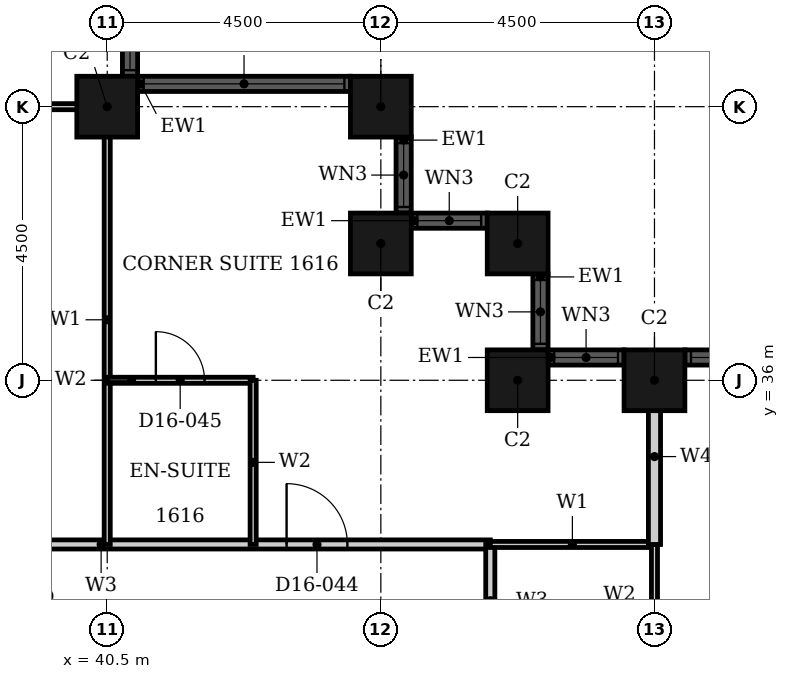
"""IFC4 building model, lengths in metres.
Left out: names, types, materials, properties, quantities, classifications, styles, units other than length and angle.
Written with IfcOpenShell. Run it as: python <this file> out.ifc"""

import sys

from ifc_helpers import new_model, si_unit, direction, frame, frame_2d, origin, origin_2d, place, context, subcontext, project, spatial, rectangle, hollow_rectangle, extrude, element, fill, save


model = new_model("IFC4")
c1 = context("Model", 3, precision=1e-05, world=origin(), true_north=direction((0.0, 1.0)))
c2 = subcontext(c1, "Body", "Model", "MODEL_VIEW")
j1 = project(units=[si_unit("LENGTHUNIT", "METRE"), si_unit("PLANEANGLEUNIT", "RADIAN")], contexts=[c1])
p1 = place(None, origin())
s1 = spatial("IfcSite", under=j1, at=p1, CompositionType="ELEMENT")
p2 = place(p1, origin())
s2 = spatial("IfcBuilding", under=s1, at=p2, CompositionType="ELEMENT")
p3 = place(p2, frame((0.0, 0.0, 70.8)))
s3 = spatial("IfcBuildingStorey", under=s2, at=p3, CompositionType="ELEMENT", Elevation=70.8)
for number, where, z_axis, x_axis in (
    (1, (49.5, 36.0, 0.0), (0.0, 0.0, 1.0), (1.0, 0.0, 0.0)),
    (2, (47.25, 36.0, 0.0), (0.0, 0.0, 1.0), (1.0, 0.0, 0.0)),
    (3, (47.25, 38.25, 0.0), (0.0, 0.0, 1.0), (1.0, 0.0, 0.0)),
    (4, (45.0, 38.25, 0.0), (0.0, 0.0, 1.0), (1.0, 0.0, 0.0)),
    (5, (45.0, 40.5, 0.0), (0.0, 0.0, 1.0), (1.0, 0.0, 0.0)),
    (6, (40.5, 40.5, 0.0), (0.0, 0.0, 1.0), (1.0, 0.0, 0.0)),
):
    element("IfcColumn", number, at=place(p3, frame(where, z_axis=z_axis, x_axis=x_axis)), inside=s3, PredefinedType="COLUMN", context=c2, shape_type="SweptSolid", body=[
        extrude(hollow_rectangle(XDim=1.0, YDim=1.0, WallThickness=0.032, at=origin_2d()), origin(), (0.0, 0.0, 1.0), 3.6),
    ])
p4 = place(p3, frame((58.0, 36.375, 0.0), z_axis=(0.0, 0.0, 1.0), x_axis=(-1.0, 0.0, 0.0)))
e7 = element("IfcWall", 7, at=p4, inside=s3, PredefinedType="SOLIDWALL", context=c2, shape_type="SweptSolid", body=[
    extrude(rectangle(XDim=8.0, YDim=0.25, at=frame_2d((4.0, 0.0))), origin(), (0.0, 0.0, 1.0), 3.6),
])
p5 = place(p4, frame((0.1, 0.0, 0.9)))
e8 = element("IfcOpeningElement", 8, at=p5, cuts=e7, PredefinedType="OPENING", context=c2, shape_type="SweptSolid", body=[
    extrude(rectangle(XDim=3.3, YDim=2.08, at=frame_2d((1.65, 1.04))), frame((0.0, 0.135, 0.0), z_axis=(0.0, -1.0, 0.0), x_axis=(1.0, 0.0, 0.0)), (0.0, 0.0, 1.0), 0.27),
])
p6 = place(p4, frame((4.6, 0.0, 0.9)))
e9 = element("IfcOpeningElement", 9, at=p6, cuts=e7, PredefinedType="OPENING", context=c2, shape_type="SweptSolid", body=[
    extrude(rectangle(XDim=3.3, YDim=2.08, at=frame_2d((1.65, 1.04))), frame((0.0, 0.135, 0.0), z_axis=(0.0, -1.0, 0.0), x_axis=(1.0, 0.0, 0.0)), (0.0, 0.0, 1.0), 0.27),
])
p7 = place(p3, frame((49.0, 36.375, 0.0), z_axis=(0.0, 0.0, 1.0), x_axis=(-1.0, 0.0, 0.0)))
e10 = element("IfcWall", 10, at=p7, inside=s3, PredefinedType="SOLIDWALL", context=c2, shape_type="SweptSolid", body=[
    extrude(rectangle(XDim=1.25, YDim=0.25, at=frame_2d((0.625, 0.0))), origin(), (0.0, 0.0, 1.0), 3.6),
])
p8 = place(p7, frame((0.1, 0.0, 0.9)))
e11 = element("IfcOpeningElement", 11, at=p8, cuts=e10, PredefinedType="OPENING", context=c2, shape_type="SweptSolid", body=[
    extrude(rectangle(XDim=1.05, YDim=2.08, at=frame_2d((0.525, 1.04))), frame((0.0, 0.135, 0.0), z_axis=(0.0, -1.0, 0.0), x_axis=(1.0, 0.0, 0.0)), (0.0, 0.0, 1.0), 0.27),
])
p9 = place(p3, frame((47.625, 36.5, 0.0), z_axis=(0.0, 0.0, 1.0), x_axis=(0.0, 1.0, 0.0)))
e12 = element("IfcWall", 12, at=p9, inside=s3, PredefinedType="SOLIDWALL", context=c2, shape_type="SweptSolid", body=[
    extrude(rectangle(XDim=1.25, YDim=0.25, at=frame_2d((0.625, 0.0))), origin(), (0.0, 0.0, 1.0), 3.6),
])
p10 = place(p9, frame((0.1, 0.0, 0.9)))
e13 = element("IfcOpeningElement", 13, at=p10, cuts=e12, PredefinedType="OPENING", context=c2, shape_type="SweptSolid", body=[
    extrude(rectangle(XDim=1.05, YDim=2.08, at=frame_2d((0.525, 1.04))), frame((0.0, 0.135, 0.0), z_axis=(0.0, -1.0, 0.0), x_axis=(1.0, 0.0, 0.0)), (0.0, 0.0, 1.0), 0.27),
])
p11 = place(p3, frame((46.75, 38.625, 0.0), z_axis=(0.0, 0.0, 1.0), x_axis=(-1.0, 0.0, 0.0)))
e14 = element("IfcWall", 14, at=p11, inside=s3, PredefinedType="SOLIDWALL", context=c2, shape_type="SweptSolid", body=[
    extrude(rectangle(XDim=1.25, YDim=0.25, at=frame_2d((0.625, 0.0))), origin(), (0.0, 0.0, 1.0), 3.6),
])
p12 = place(p11, frame((0.1, 0.0, 0.9)))
e15 = element("IfcOpeningElement", 15, at=p12, cuts=e14, PredefinedType="OPENING", context=c2, shape_type="SweptSolid", body=[
    extrude(rectangle(XDim=1.05, YDim=2.08, at=frame_2d((0.525, 1.04))), frame((0.0, 0.135, 0.0), z_axis=(0.0, -1.0, 0.0), x_axis=(1.0, 0.0, 0.0)), (0.0, 0.0, 1.0), 0.27),
])
p13 = place(p3, frame((45.375, 38.75, 0.0), z_axis=(0.0, 0.0, 1.0), x_axis=(0.0, 1.0, 0.0)))
e16 = element("IfcWall", 16, at=p13, inside=s3, PredefinedType="SOLIDWALL", context=c2, shape_type="SweptSolid", body=[
    extrude(rectangle(XDim=1.25, YDim=0.25, at=frame_2d((0.625, 0.0))), origin(), (0.0, 0.0, 1.0), 3.6),
])
p14 = place(p13, frame((0.1, 0.0, 0.9)))
e17 = element("IfcOpeningElement", 17, at=p14, cuts=e16, PredefinedType="OPENING", context=c2, shape_type="SweptSolid", body=[
    extrude(rectangle(XDim=1.05, YDim=2.08, at=frame_2d((0.525, 1.04))), frame((0.0, 0.135, 0.0), z_axis=(0.0, -1.0, 0.0), x_axis=(1.0, 0.0, 0.0)), (0.0, 0.0, 1.0), 0.27),
])
p15 = place(p3, frame((44.5, 40.875, 0.0), z_axis=(0.0, 0.0, 1.0), x_axis=(-1.0, 0.0, 0.0)))
e18 = element("IfcWall", 18, at=p15, inside=s3, PredefinedType="SOLIDWALL", context=c2, shape_type="SweptSolid", body=[
    extrude(rectangle(XDim=3.5, YDim=0.25, at=frame_2d((1.75, 0.0))), origin(), (0.0, 0.0, 1.0), 3.6),
])
p16 = place(p15, frame((0.1, 0.0, 0.9)))
e19 = element("IfcOpeningElement", 19, at=p16, cuts=e18, PredefinedType="OPENING", context=c2, shape_type="SweptSolid", body=[
    extrude(rectangle(XDim=3.3, YDim=2.08, at=frame_2d((1.65, 1.04))), frame((0.0, 0.135, 0.0), z_axis=(0.0, -1.0, 0.0), x_axis=(1.0, 0.0, 0.0)), (0.0, 0.0, 1.0), 0.27),
])
p17 = place(p3, frame((40.875, 41.0, 0.0), z_axis=(0.0, 0.0, 1.0), x_axis=(0.0, 1.0, 0.0)))
e20 = element("IfcWall", 20, at=p17, inside=s3, PredefinedType="SOLIDWALL", context=c2, shape_type="SweptSolid", body=[
    extrude(rectangle(XDim=8.0, YDim=0.25, at=frame_2d((4.0, 0.0))), origin(), (0.0, 0.0, 1.0), 3.6),
])
p18 = place(p17, frame((0.1, 0.0, 0.9)))
e21 = element("IfcOpeningElement", 21, at=p18, cuts=e20, PredefinedType="OPENING", context=c2, shape_type="SweptSolid", body=[
    extrude(rectangle(XDim=3.3, YDim=2.08, at=frame_2d((1.65, 1.04))), frame((0.0, 0.135, 0.0), z_axis=(0.0, -1.0, 0.0), x_axis=(1.0, 0.0, 0.0)), (0.0, 0.0, 1.0), 0.27),
])
p19 = place(p17, frame((4.6, 0.0, 0.9)))
e22 = element("IfcOpeningElement", 22, at=p19, cuts=e20, PredefinedType="OPENING", context=c2, shape_type="SweptSolid", body=[
    extrude(rectangle(XDim=3.3, YDim=2.08, at=frame_2d((1.65, 1.04))), frame((0.0, 0.135, 0.0), z_axis=(0.0, -1.0, 0.0), x_axis=(1.0, 0.0, 0.0)), (0.0, 0.0, 1.0), 0.27),
])
p20 = place(p3, frame((33.3, 33.3, 0.0), z_axis=(0.0, 0.0, 1.0), x_axis=(1.0, 0.0, 0.0)))
e23 = element("IfcWall", 23, at=p20, inside=s3, PredefinedType="PARTITIONING", context=c2, shape_type="SweptSolid", body=[
    extrude(rectangle(XDim=13.5, YDim=0.15, at=frame_2d((6.75, 0.0))), origin(), (0.0, 0.0, 1.0), 3.3),
])
p21 = place(p20, frame((10.15, 0.0, 0.0)))
e24 = element("IfcOpeningElement", 24, at=p21, cuts=e23, PredefinedType="OPENING", context=c2, shape_type="SweptSolid", body=[
    extrude(rectangle(XDim=1.0, YDim=2.1, at=frame_2d((0.5, 1.05))), frame((0.0, 0.085, 0.0), z_axis=(0.0, -1.0, 0.0), x_axis=(1.0, 0.0, 0.0)), (0.0, 0.0, 1.0), 0.17),
])
p22 = place(p20, frame((3.15, 0.0, 0.0)))
e25 = element("IfcOpeningElement", 25, at=p22, cuts=e23, PredefinedType="OPENING", context=c2, shape_type="SweptSolid", body=[
    extrude(rectangle(XDim=0.9, YDim=2.1, at=frame_2d((0.45, 1.05))), frame((0.0, 0.085, 0.0), z_axis=(0.0, -1.0, 0.0), x_axis=(1.0, 0.0, 0.0)), (0.0, 0.0, 1.0), 0.17),
])
p23 = place(p3, frame((46.8, 28.8, 0.0), z_axis=(0.0, 0.0, 1.0), x_axis=(0.0, 1.0, 0.0)))
e26 = element("IfcWall", 26, at=p23, inside=s3, PredefinedType="PARTITIONING", context=c2, shape_type="SweptSolid", body=[
    extrude(rectangle(XDim=4.5, YDim=0.15, at=frame_2d((2.25, 0.0))), origin(), (0.0, 0.0, 1.0), 3.3),
])
p24 = place(p23, frame((1.75, 0.0, 0.0)))
e27 = element("IfcOpeningElement", 27, at=p24, cuts=e26, PredefinedType="OPENING", context=c2, shape_type="SweptSolid", body=[
    extrude(rectangle(XDim=0.9, YDim=2.1, at=frame_2d((0.45, 1.05))), frame((0.0, 0.085, 0.0), z_axis=(0.0, -1.0, 0.0), x_axis=(1.0, 0.0, 0.0)), (0.0, 0.0, 1.0), 0.17),
])
p25 = place(p3, frame((46.8, 33.3, 0.0), z_axis=(0.0, 0.0, 1.0), x_axis=(1.0, 0.0, 0.0)))
e28 = element("IfcWall", 28, at=p25, inside=s3, PredefinedType="PARTITIONING", context=c2, shape_type="SweptSolid", body=[
    extrude(rectangle(XDim=2.7, YDim=0.1, at=frame_2d((1.35, 0.0))), origin(), (0.0, 0.0, 1.0), 3.3),
])
p26 = place(p3, frame((33.3, 40.5, 0.0), z_axis=(0.0, 0.0, 1.0), x_axis=(1.0, 0.0, 0.0)))
e29 = element("IfcWall", 29, at=p26, inside=s3, PredefinedType="PARTITIONING", context=c2, shape_type="SweptSolid", body=[
    extrude(rectangle(XDim=7.39, YDim=0.1, at=frame_2d((3.695, 0.0))), origin(), (0.0, 0.0, 1.0), 2.38),
])
p27 = place(p3, frame((40.5, 33.3, 0.0), z_axis=(0.0, 0.0, 1.0), x_axis=(0.0, 1.0, 0.0)))
e30 = element("IfcWall", 30, at=p27, inside=s3, PredefinedType="PARTITIONING", context=c2, shape_type="SweptSolid", body=[
    extrude(rectangle(XDim=7.39, YDim=0.1, at=frame_2d((3.695, 0.0))), origin(), (0.0, 0.0, 1.0), 3.3),
])
p28 = place(p3, frame((49.5, 28.8, 0.0), z_axis=(0.0, 0.0, 1.0), x_axis=(0.0, 1.0, 0.0)))
e31 = element("IfcWall", 31, at=p28, inside=s3, PredefinedType="PARTITIONING", context=c2, shape_type="SweptSolid", body=[
    extrude(rectangle(XDim=4.5, YDim=0.1, at=frame_2d((2.25, 0.0))), origin(), (0.0, 0.0, 1.0), 2.38),
])
p29 = place(p3, frame((49.5, 33.3, 0.0), z_axis=(0.0, 0.0, 1.0), x_axis=(0.0, 1.0, 0.0)))
e32 = element("IfcWall", 32, at=p29, inside=s3, PredefinedType="PARTITIONING", context=c2, shape_type="SweptSolid", body=[
    extrude(rectangle(XDim=2.89, YDim=0.2, at=frame_2d((1.445, 0.0))), origin(), (0.0, 0.0, 1.0), 2.38),
])
p30 = place(p3, frame((40.5, 36.0, 0.0), z_axis=(0.0, 0.0, 1.0), x_axis=(1.0, 0.0, 0.0)))
e33 = element("IfcWall", 33, at=p30, inside=s3, PredefinedType="PARTITIONING", context=c2, shape_type="SweptSolid", body=[
    extrude(rectangle(XDim=2.4, YDim=0.1, at=frame_2d((1.2, 0.0))), origin(), (0.0, 0.0, 1.0), 3.3),
])
p31 = place(p30, frame((0.8, 0.0, 0.0)))
e34 = element("IfcOpeningElement", 34, at=p31, cuts=e33, PredefinedType="OPENING", context=c2, shape_type="SweptSolid", body=[
    extrude(rectangle(XDim=0.8, YDim=2.1, at=frame_2d((0.4, 1.05))), frame((0.0, 0.06, 0.0), z_axis=(0.0, -1.0, 0.0), x_axis=(1.0, 0.0, 0.0)), (0.0, 0.0, 1.0), 0.12),
])
p32 = place(p3, frame((42.9, 33.3, 0.0), z_axis=(0.0, 0.0, 1.0), x_axis=(0.0, 1.0, 0.0)))
e35 = element("IfcWall", 35, at=p32, inside=s3, PredefinedType="PARTITIONING", context=c2, shape_type="SweptSolid", body=[
    extrude(rectangle(XDim=2.7, YDim=0.1, at=frame_2d((1.35, 0.0))), origin(), (0.0, 0.0, 1.0), 3.3),
])
p33 = place(p6, origin())
e36 = element("IfcWindow", 36, at=p33, inside=s3, PartitioningType="SINGLE_PANEL", PredefinedType="WINDOW", context=c2, shape_type="SweptSolid", body=[
    extrude(rectangle(XDim=3.3, YDim=2.08, at=frame_2d((1.65, 1.04))), frame((0.0, 0.03, 0.0), z_axis=(0.0, -1.0, 0.0), x_axis=(1.0, 0.0, 0.0)), (0.0, 0.0, 1.0), 0.06),
])
fill(e9, e36)
p34 = place(p8, origin())
e37 = element("IfcWindow", 37, at=p34, inside=s3, PartitioningType="SINGLE_PANEL", PredefinedType="WINDOW", context=c2, shape_type="SweptSolid", body=[
    extrude(rectangle(XDim=1.05, YDim=2.08, at=frame_2d((0.525, 1.04))), frame((0.0, 0.03, 0.0), z_axis=(0.0, -1.0, 0.0), x_axis=(1.0, 0.0, 0.0)), (0.0, 0.0, 1.0), 0.06),
])
fill(e11, e37)
p35 = place(p10, origin())
e38 = element("IfcWindow", 38, at=p35, inside=s3, PartitioningType="SINGLE_PANEL", PredefinedType="WINDOW", context=c2, shape_type="SweptSolid", body=[
    extrude(rectangle(XDim=1.05, YDim=2.08, at=frame_2d((0.525, 1.04))), frame((0.0, 0.03, 0.0), z_axis=(0.0, -1.0, 0.0), x_axis=(1.0, 0.0, 0.0)), (0.0, 0.0, 1.0), 0.06),
])
fill(e13, e38)
p36 = place(p12, origin())
e39 = element("IfcWindow", 39, at=p36, inside=s3, PartitioningType="SINGLE_PANEL", PredefinedType="WINDOW", context=c2, shape_type="SweptSolid", body=[
    extrude(rectangle(XDim=1.05, YDim=2.08, at=frame_2d((0.525, 1.04))), frame((0.0, 0.03, 0.0), z_axis=(0.0, -1.0, 0.0), x_axis=(1.0, 0.0, 0.0)), (0.0, 0.0, 1.0), 0.06),
])
fill(e15, e39)
p37 = place(p14, origin())
e40 = element("IfcWindow", 40, at=p37, inside=s3, PartitioningType="SINGLE_PANEL", PredefinedType="WINDOW", context=c2, shape_type="SweptSolid", body=[
    extrude(rectangle(XDim=1.05, YDim=2.08, at=frame_2d((0.525, 1.04))), frame((0.0, 0.03, 0.0), z_axis=(0.0, -1.0, 0.0), x_axis=(1.0, 0.0, 0.0)), (0.0, 0.0, 1.0), 0.06),
])
fill(e17, e40)
p38 = place(p16, origin())
e41 = element("IfcWindow", 41, at=p38, inside=s3, PartitioningType="SINGLE_PANEL", PredefinedType="WINDOW", context=c2, shape_type="SweptSolid", body=[
    extrude(rectangle(XDim=3.3, YDim=2.08, at=frame_2d((1.65, 1.04))), frame((0.0, 0.03, 0.0), z_axis=(0.0, -1.0, 0.0), x_axis=(1.0, 0.0, 0.0)), (0.0, 0.0, 1.0), 0.06),
])
fill(e19, e41)
p39 = place(p18, origin())
e42 = element("IfcWindow", 42, at=p39, inside=s3, PartitioningType="SINGLE_PANEL", PredefinedType="WINDOW", context=c2, shape_type="SweptSolid", body=[
    extrude(rectangle(XDim=3.3, YDim=2.08, at=frame_2d((1.65, 1.04))), frame((0.0, 0.03, 0.0), z_axis=(0.0, -1.0, 0.0), x_axis=(1.0, 0.0, 0.0)), (0.0, 0.0, 1.0), 0.06),
])
fill(e21, e42)
p40 = place(p21, origin())
e43 = element("IfcDoor", 43, at=p40, inside=s3, OperationType="SINGLE_SWING_RIGHT", PredefinedType="DOOR", context=c2, shape_type="SweptSolid", body=[
    extrude(rectangle(XDim=1.0, YDim=2.1, at=frame_2d((0.5, 1.05))), frame((0.0, 0.025, 0.0), z_axis=(0.0, -1.0, 0.0), x_axis=(1.0, 0.0, 0.0)), (0.0, 0.0, 1.0), 0.05),
])
fill(e24, e43)
p41 = place(p31, origin())
e44 = element("IfcDoor", 44, at=p41, inside=s3, OperationType="SINGLE_SWING_LEFT", PredefinedType="DOOR", context=c2, shape_type="SweptSolid", body=[
    extrude(rectangle(XDim=0.8, YDim=2.1, at=frame_2d((0.4, 1.05))), frame((0.0, 0.025, 0.0), z_axis=(0.0, -1.0, 0.0), x_axis=(1.0, 0.0, 0.0)), (0.0, 0.0, 1.0), 0.05),
])
fill(e34, e44)
save(model, sys.argv[1])
